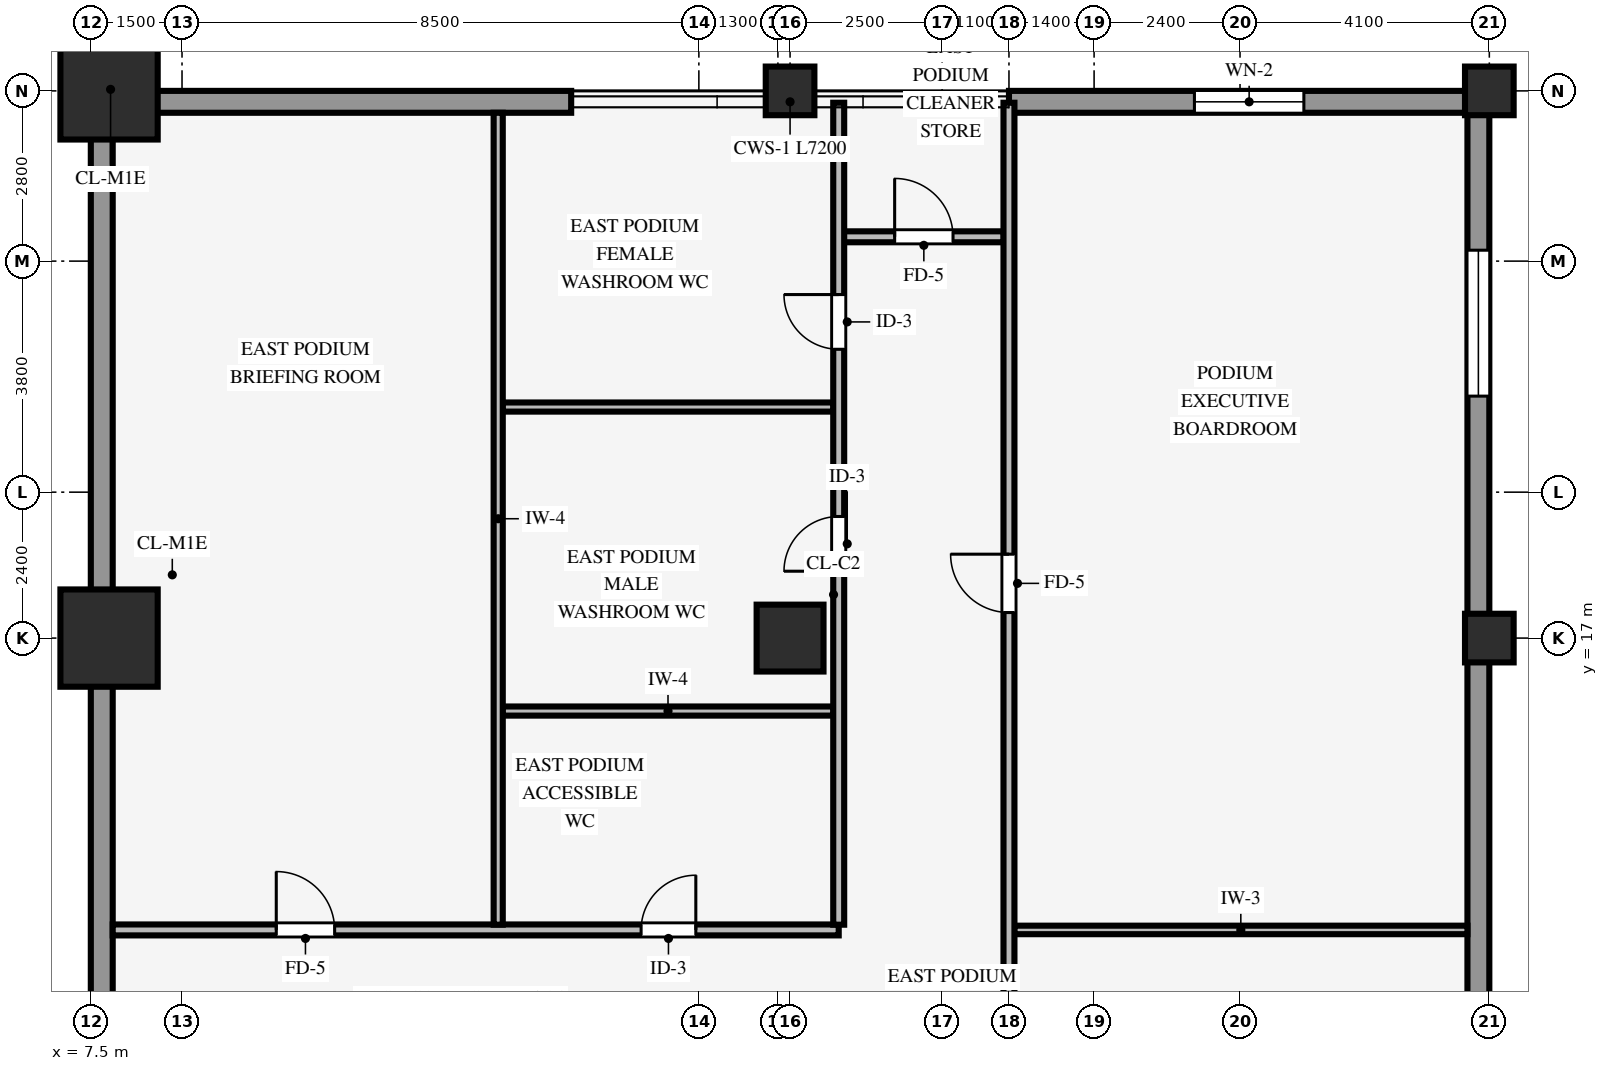
"""IFC4 building model, lengths in metres.
Left out: names, types, materials, properties, quantities, classifications, styles, units other than length and angle.
Written with IfcOpenShell. Run it as: python <this file> out.ifc"""

import sys

from ifc_helpers import new_model, si_unit, direction, frame, frame_2d, origin, origin_2d, place, context, subcontext, project, spatial, rectangle, hollow_rectangle, extrude, source, transform, mapped, element, fill, save


model = new_model("IFC4")
c1 = context("Model", 3, precision=1e-05, world=origin(), true_north=direction((0.0, 1.0)))
c2 = subcontext(c1, "Body", "Model", "MODEL_VIEW")
j1 = project(units=[si_unit("LENGTHUNIT", "METRE"), si_unit("PLANEANGLEUNIT", "RADIAN")], contexts=[c1])
p1 = place(None, origin())
s1 = spatial("IfcSite", under=j1, at=p1, CompositionType="ELEMENT")
p2 = place(p1, origin())
s2 = spatial("IfcBuilding", under=s1, at=p2, CompositionType="ELEMENT")
p3 = place(p2, frame((0.0, 0.0, 13.8)))
s3 = spatial("IfcBuildingStorey", under=s2, at=p3, CompositionType="ELEMENT", Elevation=13.8)
for number, where, z_axis, x_axis in (
    (1, (7.8, 17.0, 0.0), (0.0, 0.0, 1.0), (1.0, 0.0, 0.0)),
    (2, (7.8, 26.0, 0.0), (0.0, 0.0, 1.0), (1.0, 0.0, 0.0)),
):
    element("IfcColumn", number, at=place(p3, frame(where, z_axis=z_axis, x_axis=x_axis)), inside=s3, PredefinedType="COLUMN", context=c2, shape_type="SweptSolid", body=[
        extrude(rectangle(XDim=1.6, YDim=1.6, at=origin_2d()), origin(), (0.0, 0.0, 1.0), 4.2),
    ])
p4 = place(p3, frame((19.0, 17.0, 0.0), z_axis=(0.0, 0.0, 1.0), x_axis=(1.0, 0.0, 0.0)))
e3 = element("IfcColumn", 3, at=p4, inside=s3, PredefinedType="COLUMN", context=c2, shape_type="SweptSolid", body=[
    extrude(rectangle(XDim=1.1, YDim=1.1, at=origin_2d()), origin(), (0.0, 0.0, 1.0), 4.2),
])
for number, where, z_axis, x_axis in (
    (4, (19.0, 26.0, 0.0), (0.0, 0.0, 1.0), (1.0, 0.0, 0.0)),
    (5, (30.5, 17.0, 0.0), (0.0, 0.0, 1.0), (1.0, 0.0, 0.0)),
    (6, (30.5, 26.0, 0.0), (0.0, 0.0, 1.0), (1.0, 0.0, 0.0)),
):
    element("IfcColumn", number, at=place(p3, frame(where, z_axis=z_axis, x_axis=x_axis)), inside=s3, PredefinedType="COLUMN", context=c2, shape_type="SweptSolid", body=[
        extrude(hollow_rectangle(XDim=0.8, YDim=0.8, WallThickness=0.055, InnerFilletRadius=0.055, OuterFilletRadius=0.11, at=origin_2d()), origin(), (0.0, 0.0, 1.0), 4.2),
    ])
p5 = place(p3, frame((30.32, -25.644, 0.0), z_axis=(0.0, 0.0, 1.0), x_axis=(0.0, 1.0, 0.0)))
e7 = element("IfcWall", 7, at=p5, inside=s3, PredefinedType="STANDARD", context=c2, shape_type="SweptSolid", body=[
    extrude(rectangle(XDim=51.288, YDim=0.36, at=frame_2d((25.644, 0.0))), origin(), (0.0, 0.0, 1.0), 3.535),
])
p6 = place(p5, frame((2.264, 0.0, 0.85)))
e8 = element("IfcOpeningElement", 8, at=p6, cuts=e7, PredefinedType="OPENING", context=c2, shape_type="SweptSolid", body=[
    extrude(rectangle(XDim=2.4, YDim=2.45, at=frame_2d((1.2, 1.225))), frame((0.0, 0.19, 0.0), z_axis=(0.0, -1.0, 0.0), x_axis=(1.0, 0.0, 0.0)), (0.0, 0.0, 1.0), 0.38),
])
p7 = place(p5, frame((17.051, 0.0, 0.85)))
e9 = element("IfcOpeningElement", 9, at=p7, cuts=e7, PredefinedType="OPENING", context=c2, shape_type="SweptSolid", body=[
    extrude(rectangle(XDim=2.4, YDim=2.45, at=frame_2d((1.2, 1.225))), frame((0.0, 0.19, 0.0), z_axis=(0.0, -1.0, 0.0), x_axis=(1.0, 0.0, 0.0)), (0.0, 0.0, 1.0), 0.38),
])
p8 = place(p5, frame((21.979, 0.0, 0.85)))
e10 = element("IfcOpeningElement", 10, at=p8, cuts=e7, PredefinedType="OPENING", context=c2, shape_type="SweptSolid", body=[
    extrude(rectangle(XDim=2.4, YDim=2.45, at=frame_2d((1.2, 1.225))), frame((0.0, 0.19, 0.0), z_axis=(0.0, -1.0, 0.0), x_axis=(1.0, 0.0, 0.0)), (0.0, 0.0, 1.0), 0.38),
])
p9 = place(p5, frame((26.908, 0.0, 0.85)))
e11 = element("IfcOpeningElement", 11, at=p9, cuts=e7, PredefinedType="OPENING", context=c2, shape_type="SweptSolid", body=[
    extrude(rectangle(XDim=2.4, YDim=2.45, at=frame_2d((1.2, 1.225))), frame((0.0, 0.19, 0.0), z_axis=(0.0, -1.0, 0.0), x_axis=(1.0, 0.0, 0.0)), (0.0, 0.0, 1.0), 0.38),
])
p10 = place(p5, frame((31.837, 0.0, 0.85)))
e12 = element("IfcOpeningElement", 12, at=p10, cuts=e7, PredefinedType="OPENING", context=c2, shape_type="SweptSolid", body=[
    extrude(rectangle(XDim=2.4, YDim=2.45, at=frame_2d((1.2, 1.225))), frame((0.0, 0.19, 0.0), z_axis=(0.0, -1.0, 0.0), x_axis=(1.0, 0.0, 0.0)), (0.0, 0.0, 1.0), 0.38),
])
p11 = place(p5, frame((46.624, 0.0, 0.85)))
e13 = element("IfcOpeningElement", 13, at=p11, cuts=e7, PredefinedType="OPENING", context=c2, shape_type="SweptSolid", body=[
    extrude(rectangle(XDim=2.4, YDim=2.45, at=frame_2d((1.2, 1.225))), frame((0.0, 0.19, 0.0), z_axis=(0.0, -1.0, 0.0), x_axis=(1.0, 0.0, 0.0)), (0.0, 0.0, 1.0), 0.38),
])
p12 = place(p3, frame((7.5, 25.82, 0.0), z_axis=(0.0, 0.0, 1.0), x_axis=(1.0, 0.0, 0.0)))
e14 = element("IfcWall", 14, at=p12, inside=s3, PredefinedType="STANDARD", context=c2, shape_type="SweptSolid", body=[
    extrude(rectangle(XDim=7.9, YDim=0.36, at=frame_2d((3.95, 0.0))), origin(), (0.0, 0.0, 1.0), 2.585),
])
p13 = place(p3, frame((22.6, 25.82, 0.0), z_axis=(0.0, 0.0, 1.0), x_axis=(1.0, 0.0, 0.0)))
e15 = element("IfcWall", 15, at=p13, inside=s3, PredefinedType="STANDARD", context=c2, shape_type="SweptSolid", body=[
    extrude(rectangle(XDim=7.9, YDim=0.36, at=frame_2d((3.95, 0.0))), origin(), (0.0, 0.0, 1.0), 3.535),
])
p14 = place(p13, frame((3.05, 0.0, 0.85)))
e16 = element("IfcOpeningElement", 16, at=p14, cuts=e15, PredefinedType="OPENING", context=c2, shape_type="SweptSolid", body=[
    extrude(rectangle(XDim=1.8, YDim=2.35, at=frame_2d((0.9, 1.175))), frame((0.0, 0.19, 0.0), z_axis=(0.0, -1.0, 0.0), x_axis=(1.0, 0.0, 0.0)), (0.0, 0.0, 1.0), 0.38),
])
p15 = place(p3, frame((7.68, -25.644, 0.0), z_axis=(0.0, 0.0, 1.0), x_axis=(0.0, 1.0, 0.0)))
e17 = element("IfcWall", 17, at=p15, inside=s3, PredefinedType="STANDARD", context=c2, shape_type="SweptSolid", body=[
    extrude(rectangle(XDim=51.288, YDim=0.36, at=frame_2d((25.644, 0.0))), origin(), (0.0, 0.0, 1.0), 2.985),
])
p16 = place(p3, frame((7.86, 12.2, 0.0), z_axis=(0.0, 0.0, 1.0), x_axis=(1.0, 0.0, 0.0)))
e18 = element("IfcWall", 18, at=p16, inside=s3, PredefinedType="PARTITIONING", context=c2, shape_type="SweptSolid", body=[
    extrude(rectangle(XDim=11.94, YDim=0.18, at=frame_2d((5.97, 0.0))), origin(), (0.0, 0.0, 1.0), 4.19),
])
p17 = place(p16, frame((2.69, 0.0, 0.0)))
e19 = element("IfcOpeningElement", 19, at=p17, cuts=e18, PredefinedType="OPENING", context=c2, shape_type="SweptSolid", body=[
    extrude(rectangle(XDim=0.96, YDim=2.1, at=frame_2d((0.48, 1.05))), frame((0.0, 0.1, 0.0), z_axis=(0.0, -1.0, 0.0), x_axis=(1.0, 0.0, 0.0)), (0.0, 0.0, 1.0), 0.2),
])
p18 = place(p16, frame((8.69, 0.0, 0.0)))
e20 = element("IfcOpeningElement", 20, at=p18, cuts=e18, PredefinedType="OPENING", context=c2, shape_type="SweptSolid", body=[
    extrude(rectangle(XDim=0.9, YDim=2.1, at=frame_2d((0.45, 1.05))), frame((0.0, 0.1, 0.0), z_axis=(0.0, -1.0, 0.0), x_axis=(1.0, 0.0, 0.0)), (0.0, 0.0, 1.0), 0.2),
])
p19 = place(p3, frame((22.686, 12.2, 0.0), z_axis=(0.0, 0.0, 1.0), x_axis=(1.0, 0.0, 0.0)))
e21 = element("IfcWall", 21, at=p19, inside=s3, PredefinedType="PARTITIONING", context=c2, shape_type="SweptSolid", body=[
    extrude(rectangle(XDim=7.454, YDim=0.14, at=frame_2d((3.727, 0.0))), origin(), (0.0, 0.0, 1.0), 4.19),
])
for number, where, z_axis, x_axis in (
    (22, (14.271, 15.8, 0.0), (0.0, 0.0, 1.0), (1.0, 0.0, 0.0)),
    (23, (14.271, 20.8, 0.0), (0.0, 0.0, 1.0), (1.0, 0.0, 0.0)),
):
    element("IfcWall", number, at=place(p3, frame(where, z_axis=z_axis, x_axis=x_axis)), inside=s3, PredefinedType="PARTITIONING", context=c2, shape_type="SweptSolid", body=[
        extrude(rectangle(XDim=5.443, YDim=0.15, at=frame_2d((2.722, 0.0))), origin(), (0.0, 0.0, 1.0), 4.19),
    ])
p20 = place(p3, frame((19.886, 23.6, 0.0), z_axis=(0.0, 0.0, 1.0), x_axis=(1.0, 0.0, 0.0)))
e24 = element("IfcWall", 24, at=p20, inside=s3, PredefinedType="PARTITIONING", context=c2, shape_type="SweptSolid", body=[
    extrude(rectangle(XDim=2.628, YDim=0.18, at=frame_2d((1.314, 0.0))), origin(), (0.0, 0.0, 1.0), 4.19),
])
p21 = place(p20, frame((0.834, 0.0, 0.0)))
e25 = element("IfcOpeningElement", 25, at=p21, cuts=e24, PredefinedType="OPENING", context=c2, shape_type="SweptSolid", body=[
    extrude(rectangle(XDim=0.96, YDim=2.1, at=frame_2d((0.48, 1.05))), frame((0.0, 0.1, 0.0), z_axis=(0.0, -1.0, 0.0), x_axis=(1.0, 0.0, 0.0)), (0.0, 0.0, 1.0), 0.2),
])
p22 = place(p3, frame((14.2, 12.286, 0.0), z_axis=(0.0, 0.0, 1.0), x_axis=(0.0, 1.0, 0.0)))
e26 = element("IfcWall", 26, at=p22, inside=s3, PredefinedType="PARTITIONING", context=c2, shape_type="SweptSolid", body=[
    extrude(rectangle(XDim=13.354, YDim=0.15, at=frame_2d((6.677, 0.0))), origin(), (0.0, 0.0, 1.0), 4.19),
])
p23 = place(p3, frame((19.8, 12.286, 0.0), z_axis=(0.0, 0.0, 1.0), x_axis=(0.0, 1.0, 0.0)))
e27 = element("IfcWall", 27, at=p23, inside=s3, PredefinedType="PARTITIONING", context=c2, shape_type="SweptSolid", body=[
    extrude(rectangle(XDim=13.519, YDim=0.18, at=frame_2d((6.76, 0.0))), origin(), (0.0, 0.0, 1.0), 4.19),
])
p24 = place(p23, frame((5.814, 0.0, 0.0)))
e28 = element("IfcOpeningElement", 28, at=p24, cuts=e27, PredefinedType="OPENING", context=c2, shape_type="SweptSolid", body=[
    extrude(rectangle(XDim=0.9, YDim=2.1, at=frame_2d((0.45, 1.05))), frame((0.0, 0.1, 0.0), z_axis=(0.0, -1.0, 0.0), x_axis=(1.0, 0.0, 0.0)), (0.0, 0.0, 1.0), 0.2),
])
p25 = place(p23, frame((9.464, 0.0, 0.0)))
e29 = element("IfcOpeningElement", 29, at=p25, cuts=e27, PredefinedType="OPENING", context=c2, shape_type="SweptSolid", body=[
    extrude(rectangle(XDim=0.9, YDim=2.1, at=frame_2d((0.45, 1.05))), frame((0.0, 0.1, 0.0), z_axis=(0.0, -1.0, 0.0), x_axis=(1.0, 0.0, 0.0)), (0.0, 0.0, 1.0), 0.2),
])
p26 = place(p3, frame((22.6, -12.114, 0.0), z_axis=(0.0, 0.0, 1.0), x_axis=(0.0, 1.0, 0.0)))
e30 = element("IfcWall", 30, at=p26, inside=s3, PredefinedType="PARTITIONING", context=c2, shape_type="SweptSolid", body=[
    extrude(rectangle(XDim=37.919, YDim=0.18, at=frame_2d((18.959, 0.0))), origin(), (0.0, 0.0, 1.0), 4.19),
])
p27 = place(p26, frame((11.634, 0.0, 0.0)))
e31 = element("IfcOpeningElement", 31, at=p27, cuts=e30, PredefinedType="OPENING", context=c2, shape_type="SweptSolid", body=[
    extrude(rectangle(XDim=0.96, YDim=2.1, at=frame_2d((0.48, 1.05))), frame((0.0, 0.1, 0.0), z_axis=(0.0, -1.0, 0.0), x_axis=(1.0, 0.0, 0.0)), (0.0, 0.0, 1.0), 0.2),
])
p28 = place(p26, frame((29.534, 0.0, 0.0)))
e32 = element("IfcOpeningElement", 32, at=p28, cuts=e30, PredefinedType="OPENING", context=c2, shape_type="SweptSolid", body=[
    extrude(rectangle(XDim=0.96, YDim=2.1, at=frame_2d((0.48, 1.05))), frame((0.0, 0.1, 0.0), z_axis=(0.0, -1.0, 0.0), x_axis=(1.0, 0.0, 0.0)), (0.0, 0.0, 1.0), 0.2),
])
m1 = source(origin(), c2, "Body", "SweptSolid", [
    extrude(rectangle(XDim=2.4, YDim=2.45, at=frame_2d((1.2, 1.225))), frame((0.0, 0.03, 0.0), z_axis=(0.0, -1.0, 0.0), x_axis=(1.0, 0.0, 0.0)), (0.0, 0.0, 1.0), 0.06),
])
p29 = place(p11, origin())
e33 = element("IfcWindow", 33, at=p29, inside=s3, PartitioningType="SINGLE_PANEL", PredefinedType="WINDOW", context=c2, shape_type="MappedRepresentation", body=[
    mapped(m1, transform((0.0, 0.0, 0.0), scale=1.0)),
])
fill(e13, e33)
m2 = source(origin(), c2, "Body", "SweptSolid", [
    extrude(rectangle(XDim=1.8, YDim=2.35, at=frame_2d((0.9, 1.175))), frame((0.0, 0.03, 0.0), z_axis=(0.0, -1.0, 0.0), x_axis=(1.0, 0.0, 0.0)), (0.0, 0.0, 1.0), 0.06),
])
p30 = place(p14, origin())
e34 = element("IfcWindow", 34, at=p30, inside=s3, PartitioningType="SINGLE_PANEL", PredefinedType="WINDOW", context=c2, shape_type="MappedRepresentation", body=[
    mapped(m2, transform((0.0, 0.0, 0.0), scale=1.0)),
])
fill(e16, e34)
m3 = source(origin(), c2, "Body", "SweptSolid", [
    extrude(rectangle(XDim=0.96, YDim=2.1, at=frame_2d((0.48, 1.05))), frame((0.0, 0.025, 0.0), z_axis=(0.0, -1.0, 0.0), x_axis=(1.0, 0.0, 0.0)), (0.0, 0.0, 1.0), 0.05),
])
p31 = place(p28, origin())
e35 = element("IfcDoor", 35, at=p31, inside=s3, OperationType="SINGLE_SWING_RIGHT", PredefinedType="DOOR", context=c2, shape_type="MappedRepresentation", body=[
    mapped(m3, transform((0.0, 0.0, 0.0), scale=1.0)),
])
fill(e32, e35)
p32 = place(p17, origin())
e36 = element("IfcDoor", 36, at=p32, inside=s3, OperationType="SINGLE_SWING_LEFT", PredefinedType="DOOR", context=c2, shape_type="MappedRepresentation", body=[
    mapped(m3, transform((0.0, 0.0, 0.0), scale=1.0)),
])
fill(e19, e36)
m4 = source(origin(), c2, "Body", "SweptSolid", [
    extrude(rectangle(XDim=0.9, YDim=2.1, at=frame_2d((0.45, 1.05))), frame((0.0, 0.025, 0.0), z_axis=(0.0, -1.0, 0.0), x_axis=(1.0, 0.0, 0.0)), (0.0, 0.0, 1.0), 0.05),
])
p33 = place(p18, origin())
e37 = element("IfcDoor", 37, at=p33, inside=s3, OperationType="SINGLE_SWING_RIGHT", PredefinedType="DOOR", context=c2, shape_type="MappedRepresentation", body=[
    mapped(m4, transform((0.0, 0.0, 0.0), scale=1.0)),
])
fill(e20, e37)
p34 = place(p24, origin())
e38 = element("IfcDoor", 38, at=p34, inside=s3, OperationType="SINGLE_SWING_LEFT", PredefinedType="DOOR", context=c2, shape_type="MappedRepresentation", body=[
    mapped(m4, transform((0.0, 0.0, 0.0), scale=1.0)),
])
fill(e28, e38)
p35 = place(p25, origin())
e39 = element("IfcDoor", 39, at=p35, inside=s3, OperationType="SINGLE_SWING_RIGHT", PredefinedType="DOOR", context=c2, shape_type="MappedRepresentation", body=[
    mapped(m4, transform((0.0, 0.0, 0.0), scale=1.0)),
])
fill(e29, e39)
p36 = place(p21, origin())
e40 = element("IfcDoor", 40, at=p36, inside=s3, OperationType="SINGLE_SWING_LEFT", PredefinedType="DOOR", context=c2, shape_type="MappedRepresentation", body=[
    mapped(m3, transform((0.0, 0.0, 0.0), scale=1.0)),
])
fill(e25, e40)
save(model, sys.argv[1])
